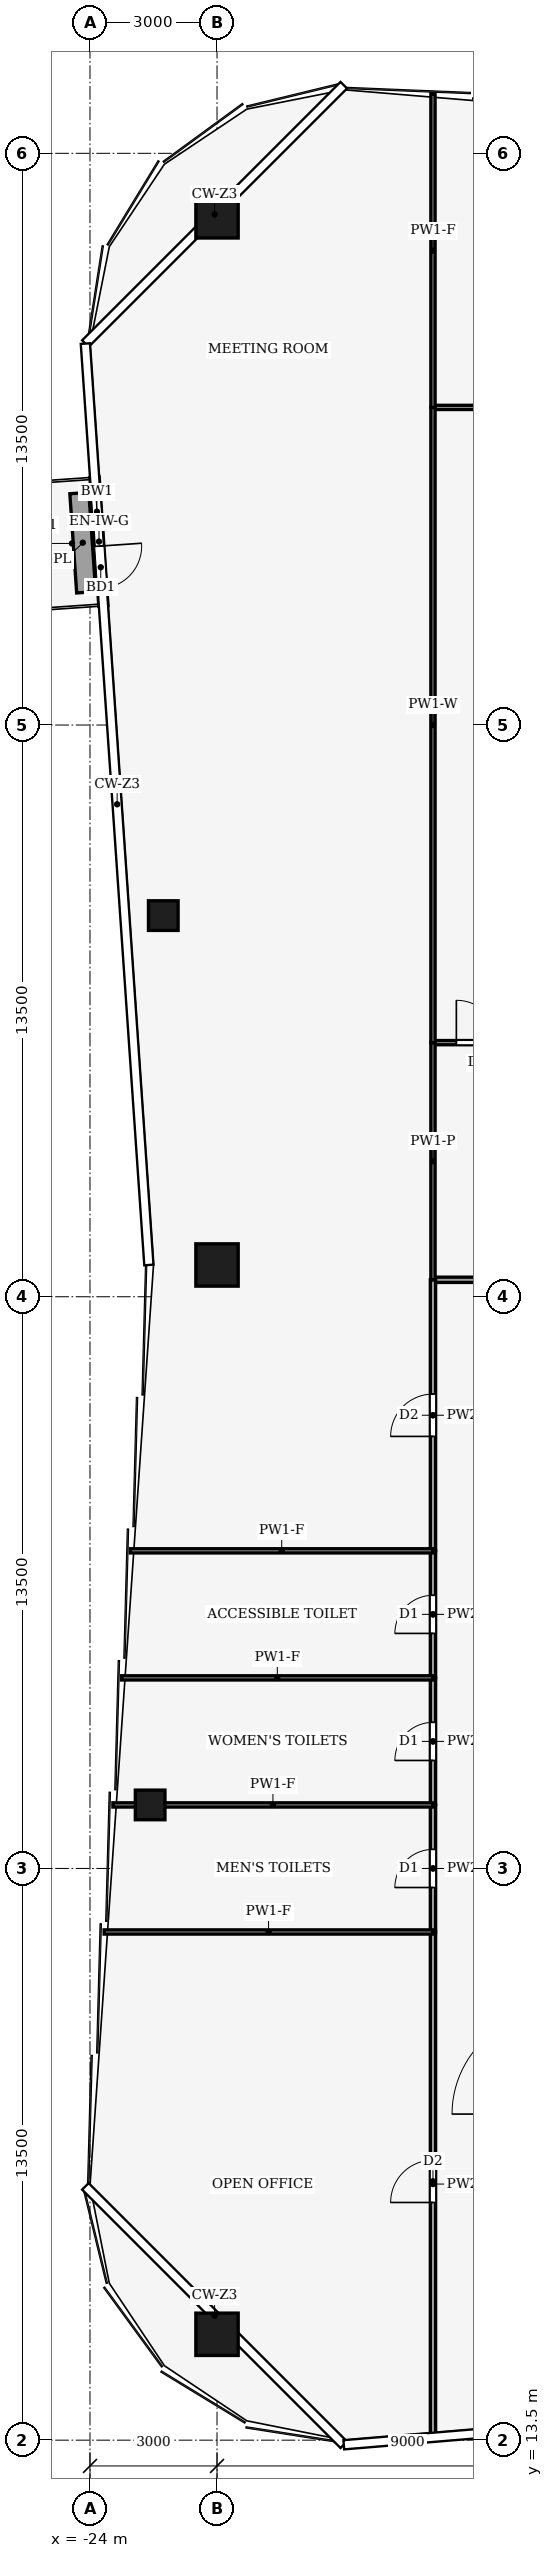
"""IFC4 building model, lengths in metres.
Left out: names, types, materials, properties, quantities, classifications, styles, units other than length and angle.
Written with IfcOpenShell. Run it as: python <this file> out.ifc"""

import sys

from ifc_helpers import new_model, si_unit, direction, frame, frame_2d, origin, origin_2d, place, context, subcontext, project, spatial, rectangle, hollow_rectangle, extrude, element, fill, save


model = new_model("IFC4")
c1 = context("Model", 3, precision=1e-05, world=origin(), true_north=direction((0.0, 1.0)))
c2 = subcontext(c1, "Body", "Model", "MODEL_VIEW")
j1 = project(units=[si_unit("LENGTHUNIT", "METRE"), si_unit("PLANEANGLEUNIT", "RADIAN")], contexts=[c1])
p1 = place(None, origin())
s1 = spatial("IfcSite", under=j1, at=p1, CompositionType="ELEMENT")
p2 = place(p1, origin())
s2 = spatial("IfcBuilding", under=s1, at=p2, CompositionType="ELEMENT")
p3 = place(p2, frame((0.0, 0.0, 202.0)))
s3 = spatial("IfcBuildingStorey", under=s2, at=p3, CompositionType="ELEMENT", Elevation=202.0)
for number, where, z_axis, x_axis in (
    (1, (-21.0, 66.0, 0.0), (0.0, 0.0, 1.0), (1.0, 0.0, 0.0)),
    (2, (-21.0, 16.0, 0.0), (0.0, 0.0, 1.0), (1.0, 0.0, 0.0)),
    (3, (-21.0, 41.25, 0.0), (0.0, 0.0, 1.0), (1.0, 0.0, 0.0)),
):
    element("IfcColumn", number, at=place(p3, frame(where, z_axis=z_axis, x_axis=x_axis)), inside=s3, PredefinedType="COLUMN", context=c2, shape_type="SweptSolid", body=[
        extrude(hollow_rectangle(XDim=1.0, YDim=1.0, WallThickness=0.06, at=origin_2d()), origin(), (0.0, 0.0, 1.0), 4.0),
    ])
for number, where, z_axis, x_axis in (
    (4, (-22.579, 28.5, 0.0), (0.0, 0.0, 1.0), (1.0, 0.0, 0.0)),
    (5, (-22.269, 49.5, 0.0), (0.0, 0.0, 1.0), (1.0, 0.0, 0.0)),
):
    element("IfcColumn", number, at=place(p3, frame(where, z_axis=z_axis, x_axis=x_axis)), inside=s3, PredefinedType="COLUMN", context=c2, shape_type="SweptSolid", body=[
        extrude(hollow_rectangle(XDim=0.7, YDim=0.7, WallThickness=0.03, at=origin_2d()), origin(), (0.0, 0.0, 1.0), 4.0),
    ])
p4 = place(p3, frame((-23.892, 59.853, 0.0), z_axis=(0.0, 0.0, 1.0), x_axis=(0.068788350144, -0.997631276016, 0.0)))
e6 = element("IfcWall", 6, at=p4, inside=s3, PredefinedType="SOLIDWALL", context=c2, shape_type="SweptSolid", body=[
    extrude(rectangle(XDim=3.049, YDim=0.218, at=frame_2d((1.524, 0.0))), origin(), (0.0, 0.0, 1.0), 3.65),
])
p5 = place(p4, frame((1.632, 0.0, 0.0)))
e7 = element("IfcOpeningElement", 7, at=p5, cuts=e6, PredefinedType="OPENING", context=c2, shape_type="SweptSolid", body=[
    extrude(rectangle(XDim=1.0, YDim=2.1, at=frame_2d((0.5, 1.05))), frame((0.0, 0.119, 0.0), z_axis=(0.0, -1.0, 0.0), x_axis=(1.0, 0.0, 0.0)), (0.0, 0.0, 1.0), 0.238),
])
p6 = place(p4, frame((0.416, 0.0, 0.9)))
e8 = element("IfcOpeningElement", 8, at=p6, cuts=e6, PredefinedType="OPENING", context=c2, shape_type="SweptSolid", body=[
    extrude(rectangle(XDim=0.8, YDim=1.2, at=frame_2d((0.4, 0.6))), frame((0.0, 0.119, 0.0), z_axis=(0.0, -1.0, 0.0), x_axis=(1.0, 0.0, 0.0)), (0.0, 0.0, 1.0), 0.238),
])
p7 = place(p3, frame((-24.251, 59.477, 0.0), z_axis=(0.0, 0.0, 1.0), x_axis=(0.068816361971, -0.997629344158, 0.0)))
e9 = element("IfcWall", 9, at=p7, inside=s3, PredefinedType="USERDEFINED", context=c2, shape_type="SweptSolid", body=[
    extrude(rectangle(XDim=2.349, YDim=0.45, at=frame_2d((1.174, 0.0))), origin(), (0.0, 0.0, 1.0), 0.4),
])
p8 = place(p3, frame((-15.9, 40.9, 0.0), z_axis=(0.0, 0.0, 1.0), x_axis=(1.0, 0.0, 0.0)))
e10 = element("IfcWall", 10, at=p8, inside=s3, PredefinedType="PARTITIONING", context=c2, shape_type="SweptSolid", body=[
    extrude(rectangle(XDim=6.9, YDim=0.125, at=frame_2d((3.45, 0.0))), origin(), (0.0, 0.0, 1.0), 3.44),
])
p9 = place(p8, frame((2.95, 0.0, 0.0)))
e11 = element("IfcOpeningElement", 11, at=p9, cuts=e10, PredefinedType="OPENING", context=c2, shape_type="SweptSolid", body=[
    extrude(rectangle(XDim=1.0, YDim=2.1, at=frame_2d((0.5, 1.05))), frame((0.0, 0.073, 0.0), z_axis=(0.0, -1.0, 0.0), x_axis=(1.0, 0.0, 0.0)), (0.0, 0.0, 1.0), 0.145),
])
p10 = place(p3, frame((-15.9, 13.595, 0.0), z_axis=(0.0, 0.0, 1.0), x_axis=(0.0, 1.0, 0.0)))
e12 = element("IfcWall", 12, at=p10, inside=s3, PredefinedType="PARTITIONING", context=c2, shape_type="SweptSolid", body=[
    extrude(rectangle(XDim=11.905, YDim=0.125, at=frame_2d((5.953, 0.0))), origin(), (0.0, 0.0, 1.0), 3.04),
])
p11 = place(p10, frame((5.518, 0.0, 0.0)))
e13 = element("IfcOpeningElement", 13, at=p11, cuts=e12, PredefinedType="OPENING", context=c2, shape_type="SweptSolid", body=[
    extrude(rectangle(XDim=1.0, YDim=2.1, at=frame_2d((0.5, 1.05))), frame((0.0, 0.073, 0.0), z_axis=(0.0, -1.0, 0.0), x_axis=(1.0, 0.0, 0.0)), (0.0, 0.0, 1.0), 0.145),
])
p12 = place(p3, frame((-15.9, 25.5, 0.0), z_axis=(0.0, 0.0, 1.0), x_axis=(0.0, 1.0, 0.0)))
e14 = element("IfcWall", 14, at=p12, inside=s3, PredefinedType="PARTITIONING", context=c2, shape_type="SweptSolid", body=[
    extrude(rectangle(XDim=3.0, YDim=0.125, at=frame_2d((1.5, 0.0))), origin(), (0.0, 0.0, 1.0), 3.87),
])
p13 = place(p12, frame((1.05, 0.0, 0.0)))
e15 = element("IfcOpeningElement", 15, at=p13, cuts=e14, PredefinedType="OPENING", context=c2, shape_type="SweptSolid", body=[
    extrude(rectangle(XDim=0.9, YDim=2.1, at=frame_2d((0.45, 1.05))), frame((0.0, 0.073, 0.0), z_axis=(0.0, -1.0, 0.0), x_axis=(1.0, 0.0, 0.0)), (0.0, 0.0, 1.0), 0.145),
])
p14 = place(p3, frame((-15.9, 28.5, 0.0), z_axis=(0.0, 0.0, 1.0), x_axis=(0.0, 1.0, 0.0)))
e16 = element("IfcWall", 16, at=p14, inside=s3, PredefinedType="PARTITIONING", context=c2, shape_type="SweptSolid", body=[
    extrude(rectangle(XDim=3.0, YDim=0.125, at=frame_2d((1.5, 0.0))), origin(), (0.0, 0.0, 1.0), 3.87),
])
p15 = place(p14, frame((1.05, 0.0, 0.0)))
e17 = element("IfcOpeningElement", 17, at=p15, cuts=e16, PredefinedType="OPENING", context=c2, shape_type="SweptSolid", body=[
    extrude(rectangle(XDim=0.9, YDim=2.1, at=frame_2d((0.45, 1.05))), frame((0.0, 0.073, 0.0), z_axis=(0.0, -1.0, 0.0), x_axis=(1.0, 0.0, 0.0)), (0.0, 0.0, 1.0), 0.145),
])
p16 = place(p3, frame((-15.9, 31.5, 0.0), z_axis=(0.0, 0.0, 1.0), x_axis=(0.0, 1.0, 0.0)))
e18 = element("IfcWall", 18, at=p16, inside=s3, PredefinedType="PARTITIONING", context=c2, shape_type="SweptSolid", body=[
    extrude(rectangle(XDim=3.0, YDim=0.125, at=frame_2d((1.5, 0.0))), origin(), (0.0, 0.0, 1.0), 3.87),
])
p17 = place(p16, frame((1.05, 0.0, 0.0)))
e19 = element("IfcOpeningElement", 19, at=p17, cuts=e18, PredefinedType="OPENING", context=c2, shape_type="SweptSolid", body=[
    extrude(rectangle(XDim=0.9, YDim=2.1, at=frame_2d((0.45, 1.05))), frame((0.0, 0.073, 0.0), z_axis=(0.0, -1.0, 0.0), x_axis=(1.0, 0.0, 0.0)), (0.0, 0.0, 1.0), 0.145),
])
p18 = place(p3, frame((-15.9, 34.5, 0.0), z_axis=(0.0, 0.0, 1.0), x_axis=(0.0, 1.0, 0.0)))
e20 = element("IfcWall", 20, at=p18, inside=s3, PredefinedType="PARTITIONING", context=c2, shape_type="SweptSolid", body=[
    extrude(rectangle(XDim=6.404, YDim=0.125, at=frame_2d((3.202, 0.0))), origin(), (0.0, 0.0, 1.0), 3.14),
])
p19 = place(p18, frame((2.702, 0.0, 0.0)))
e21 = element("IfcOpeningElement", 21, at=p19, cuts=e20, PredefinedType="OPENING", context=c2, shape_type="SweptSolid", body=[
    extrude(rectangle(XDim=1.0, YDim=2.1, at=frame_2d((0.5, 1.05))), frame((0.0, 0.073, 0.0), z_axis=(0.0, -1.0, 0.0), x_axis=(1.0, 0.0, 0.0)), (0.0, 0.0, 1.0), 0.145),
])
p20 = place(p3, frame((-15.9, 46.5, 0.0), z_axis=(0.0, 0.0, 1.0), x_axis=(1.0, 0.0, 0.0)))
e22 = element("IfcWall", 22, at=p20, inside=s3, PredefinedType="PARTITIONING", context=c2, shape_type="SweptSolid", body=[
    extrude(rectangle(XDim=6.904, YDim=0.1, at=frame_2d((3.452, 0.0))), origin(), (0.0, 0.0, 1.0), 3.44),
])
p21 = place(p20, frame((0.552, 0.0, 0.0)))
e23 = element("IfcOpeningElement", 23, at=p21, cuts=e22, PredefinedType="OPENING", context=c2, shape_type="SweptSolid", body=[
    extrude(rectangle(XDim=1.0, YDim=2.1, at=frame_2d((0.5, 1.05))), frame((0.0, 0.06, 0.0), z_axis=(0.0, -1.0, 0.0), x_axis=(1.0, 0.0, 0.0)), (0.0, 0.0, 1.0), 0.12),
])
p22 = place(p3, frame((-15.9, 46.504, 0.0), z_axis=(0.0, 0.0, 1.0), x_axis=(0.0, -1.0, 0.0)))
e24 = element("IfcWall", 24, at=p22, inside=s3, PredefinedType="PARTITIONING", context=c2, shape_type="SweptSolid", body=[
    extrude(rectangle(XDim=5.608, YDim=0.1, at=frame_2d((2.804, 0.0))), origin(), (0.0, 0.0, 1.0), 3.44),
])
p23 = place(p3, frame((-15.9, 61.5, 0.0), z_axis=(0.0, 0.0, 1.0), x_axis=(1.0, 0.0, 0.0)))
e25 = element("IfcWall", 25, at=p23, inside=s3, PredefinedType="PARTITIONING", context=c2, shape_type="SweptSolid", body=[
    extrude(rectangle(XDim=6.9, YDim=0.1, at=frame_2d((3.45, 0.0))), origin(), (0.0, 0.0, 1.0), 3.24),
])
p24 = place(p23, frame((2.95, 0.0, 0.0)))
e26 = element("IfcOpeningElement", 26, at=p24, cuts=e25, PredefinedType="OPENING", context=c2, shape_type="SweptSolid", body=[
    extrude(rectangle(XDim=1.0, YDim=2.1, at=frame_2d((0.5, 1.05))), frame((0.0, 0.06, 0.0), z_axis=(0.0, -1.0, 0.0), x_axis=(1.0, 0.0, 0.0)), (0.0, 0.0, 1.0), 0.12),
])
p25 = place(p3, frame((-15.9, 61.504, 0.0), z_axis=(0.0, 0.0, 1.0), x_axis=(0.0, -1.0, 0.0)))
e27 = element("IfcWall", 27, at=p25, inside=s3, PredefinedType="PARTITIONING", context=c2, shape_type="SweptSolid", body=[
    extrude(rectangle(XDim=15.008, YDim=0.1, at=frame_2d((7.504, 0.0))), origin(), (0.0, 0.0, 1.0), 3.24),
])
p26 = place(p3, frame((-15.9, 68.905, 0.0), z_axis=(0.0, 0.0, 1.0), x_axis=(0.0, -1.0, 0.0)))
e28 = element("IfcWall", 28, at=p26, inside=s3, PredefinedType="PARTITIONING", context=c2, shape_type="SweptSolid", body=[
    extrude(rectangle(XDim=7.409, YDim=0.1, at=frame_2d((3.705, 0.0))), origin(), (0.0, 0.0, 1.0), 3.04),
])
p27 = place(p3, frame((-15.9, 25.5, 0.0), z_axis=(0.0, 0.0, 1.0), x_axis=(-1.0, 0.0, 0.0)))
e29 = element("IfcWall", 29, at=p27, inside=s3, PredefinedType="PARTITIONING", context=c2, shape_type="SweptSolid", body=[
    extrude(rectangle(XDim=7.766, YDim=0.1, at=frame_2d((3.883, 0.0))), origin(), (0.0, 0.0, 1.0), 3.04),
])
p28 = place(p3, frame((-15.9, 28.5, 0.0), z_axis=(0.0, 0.0, 1.0), x_axis=(-1.0, 0.0, 0.0)))
e30 = element("IfcWall", 30, at=p28, inside=s3, PredefinedType="PARTITIONING", context=c2, shape_type="SweptSolid", body=[
    extrude(rectangle(XDim=7.559, YDim=0.1, at=frame_2d((3.78, 0.0))), origin(), (0.0, 0.0, 1.0), 3.04),
])
p29 = place(p3, frame((-15.9, 31.5, 0.0), z_axis=(0.0, 0.0, 1.0), x_axis=(-1.0, 0.0, 0.0)))
e31 = element("IfcWall", 31, at=p29, inside=s3, PredefinedType="PARTITIONING", context=c2, shape_type="SweptSolid", body=[
    extrude(rectangle(XDim=7.353, YDim=0.1, at=frame_2d((3.676, 0.0))), origin(), (0.0, 0.0, 1.0), 3.04),
])
p30 = place(p3, frame((-15.9, 34.5, 0.0), z_axis=(0.0, 0.0, 1.0), x_axis=(-1.0, 0.0, 0.0)))
e32 = element("IfcWall", 32, at=p30, inside=s3, PredefinedType="PARTITIONING", context=c2, shape_type="SweptSolid", body=[
    extrude(rectangle(XDim=7.146, YDim=0.1, at=frame_2d((3.573, 0.0))), origin(), (0.0, 0.0, 1.0), 3.04),
])
p31 = place(p5, origin())
e33 = element("IfcDoor", 33, at=p31, inside=s3, OperationType="SINGLE_SWING_RIGHT", PredefinedType="DOOR", context=c2, shape_type="SweptSolid", body=[
    extrude(rectangle(XDim=1.0, YDim=2.1, at=frame_2d((0.5, 1.05))), frame((0.0, 0.025, 0.0), z_axis=(0.0, -1.0, 0.0), x_axis=(1.0, 0.0, 0.0)), (0.0, 0.0, 1.0), 0.05),
])
fill(e7, e33)
p32 = place(p6, origin())
e34 = element("IfcWindow", 34, at=p32, inside=s3, PartitioningType="SINGLE_PANEL", PredefinedType="WINDOW", context=c2, shape_type="SweptSolid", body=[
    extrude(rectangle(XDim=0.8, YDim=1.2, at=frame_2d((0.4, 0.6))), frame((0.0, 0.03, 0.0), z_axis=(0.0, -1.0, 0.0), x_axis=(1.0, 0.0, 0.0)), (0.0, 0.0, 1.0), 0.06),
])
fill(e8, e34)
p33 = place(p11, origin())
e35 = element("IfcDoor", 35, at=p33, inside=s3, OperationType="SINGLE_SWING_RIGHT", PredefinedType="DOOR", context=c2, shape_type="SweptSolid", body=[
    extrude(rectangle(XDim=1.0, YDim=2.1, at=frame_2d((0.5, 1.05))), frame((0.0, 0.025, 0.0), z_axis=(0.0, -1.0, 0.0), x_axis=(1.0, 0.0, 0.0)), (0.0, 0.0, 1.0), 0.05),
])
fill(e13, e35)
p34 = place(p13, origin())
e36 = element("IfcDoor", 36, at=p34, inside=s3, OperationType="SINGLE_SWING_RIGHT", PredefinedType="DOOR", context=c2, shape_type="SweptSolid", body=[
    extrude(rectangle(XDim=0.9, YDim=2.1, at=frame_2d((0.45, 1.05))), frame((0.0, 0.025, 0.0), z_axis=(0.0, -1.0, 0.0), x_axis=(1.0, 0.0, 0.0)), (0.0, 0.0, 1.0), 0.05),
])
fill(e15, e36)
p35 = place(p15, origin())
e37 = element("IfcDoor", 37, at=p35, inside=s3, OperationType="SINGLE_SWING_LEFT", PredefinedType="DOOR", context=c2, shape_type="SweptSolid", body=[
    extrude(rectangle(XDim=0.9, YDim=2.1, at=frame_2d((0.45, 1.05))), frame((0.0, 0.025, 0.0), z_axis=(0.0, -1.0, 0.0), x_axis=(1.0, 0.0, 0.0)), (0.0, 0.0, 1.0), 0.05),
])
fill(e17, e37)
p36 = place(p17, origin())
e38 = element("IfcDoor", 38, at=p36, inside=s3, OperationType="SINGLE_SWING_RIGHT", PredefinedType="DOOR", context=c2, shape_type="SweptSolid", body=[
    extrude(rectangle(XDim=0.9, YDim=2.1, at=frame_2d((0.45, 1.05))), frame((0.0, 0.025, 0.0), z_axis=(0.0, -1.0, 0.0), x_axis=(1.0, 0.0, 0.0)), (0.0, 0.0, 1.0), 0.05),
])
fill(e19, e38)
p37 = place(p19, origin())
e39 = element("IfcDoor", 39, at=p37, inside=s3, OperationType="SINGLE_SWING_LEFT", PredefinedType="DOOR", context=c2, shape_type="SweptSolid", body=[
    extrude(rectangle(XDim=1.0, YDim=2.1, at=frame_2d((0.5, 1.05))), frame((0.0, 0.025, 0.0), z_axis=(0.0, -1.0, 0.0), x_axis=(1.0, 0.0, 0.0)), (0.0, 0.0, 1.0), 0.05),
])
fill(e21, e39)
p38 = place(p21, origin())
e40 = element("IfcDoor", 40, at=p38, inside=s3, OperationType="SINGLE_SWING_LEFT", PredefinedType="DOOR", context=c2, shape_type="SweptSolid", body=[
    extrude(rectangle(XDim=1.0, YDim=2.1, at=frame_2d((0.5, 1.05))), frame((0.0, 0.025, 0.0), z_axis=(0.0, -1.0, 0.0), x_axis=(1.0, 0.0, 0.0)), (0.0, 0.0, 1.0), 0.05),
])
fill(e23, e40)
save(model, sys.argv[1])
